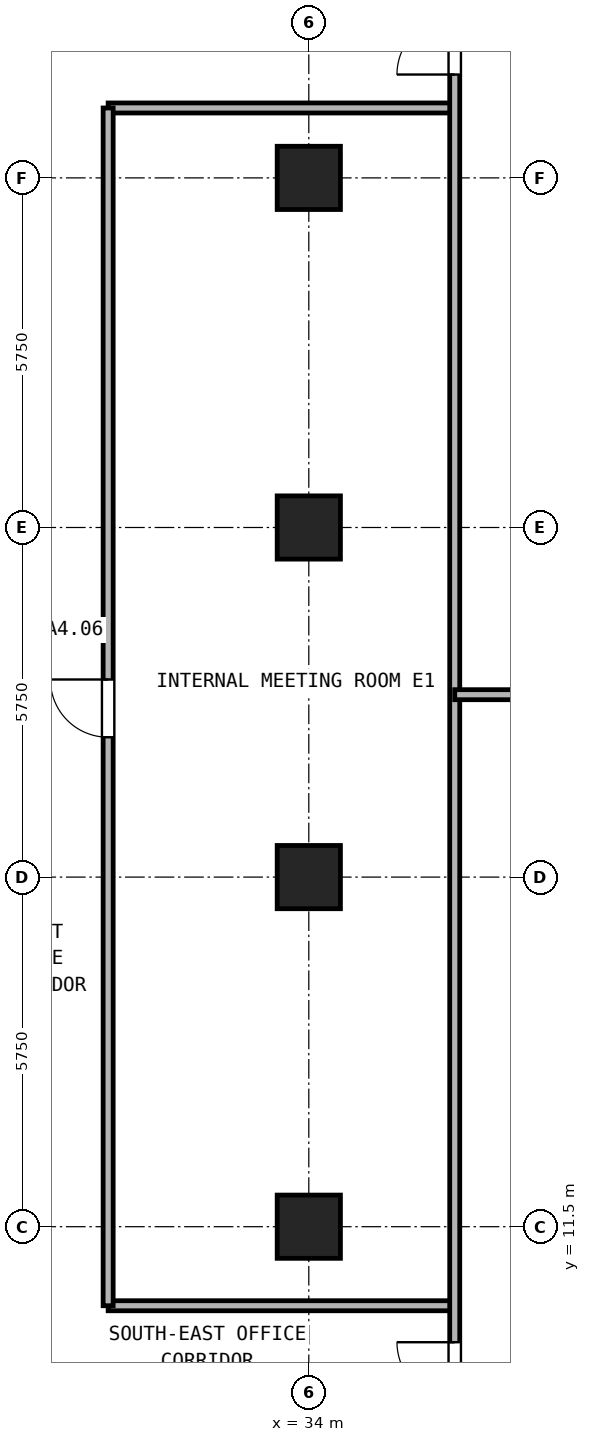
"""IFC4 building model, lengths in metres.
Left out: names, types, materials, properties, quantities, classifications, styles, units other than length and angle.
Written with IfcOpenShell. Run it as: python <this file> out.ifc"""

import sys

from ifc_helpers import new_model, si_unit, direction, frame, frame_2d, origin, origin_2d, place, context, subcontext, project, spatial, rectangle, hollow_rectangle, extrude, source, transform, mapped, element, fill, save


model = new_model("IFC4")
c1 = context("Model", 3, precision=1e-05, world=origin(), true_north=direction((0.0, 1.0)))
c2 = subcontext(c1, "Body", "Model", "MODEL_VIEW")
j1 = project(units=[si_unit("LENGTHUNIT", "METRE"), si_unit("PLANEANGLEUNIT", "RADIAN")], contexts=[c1])
p1 = place(None, origin())
s1 = spatial("IfcSite", under=j1, at=p1, CompositionType="ELEMENT")
p2 = place(p1, origin())
s2 = spatial("IfcBuilding", under=s1, at=p2, CompositionType="ELEMENT")
p3 = place(p2, frame((0.0, 0.0, 44.1)))
s3 = spatial("IfcBuildingStorey", under=s2, at=p3, CompositionType="ELEMENT", Elevation=44.1)
m1 = source(origin(), c2, "Body", "SweptSolid", [
    extrude(hollow_rectangle(XDim=1.04, YDim=1.04, WallThickness=0.065, at=origin_2d()), origin(), (0.0, 0.0, 1.0), 3.32),
])
for number, where, z_axis, x_axis in (
    (1, (34.0, 11.5, 0.0), (0.0, 0.0, 1.0), (1.0, 0.0, 0.0)),
    (2, (34.0, 17.25, 0.0), (0.0, 0.0, 1.0), (1.0, 0.0, 0.0)),
    (3, (34.0, 23.0, 0.0), (0.0, 0.0, 1.0), (1.0, 0.0, 0.0)),
    (4, (34.0, 28.75, 0.0), (0.0, 0.0, 1.0), (1.0, 0.0, 0.0)),
):
    element("IfcColumn", number, at=place(p3, frame(where, z_axis=z_axis, x_axis=x_axis)), inside=s3, PredefinedType="COLUMN", context=c2, shape_type="MappedRepresentation", body=[
        mapped(m1, transform((0.0, 0.0, 0.0), x_axis=(1.0, 0.0, 0.0), y_axis=(0.0, 1.0, 0.0), z_axis=(0.0, 0.0, 1.0), scale=1.0)),
    ])
for number, where, z_axis, x_axis in (
    (5, (30.7, 10.2, 0.0), (0.0, 0.0, 1.0), (1.0, 0.0, 0.0)),
    (6, (30.7, 29.9, 0.0), (0.0, 0.0, 1.0), (1.0, 0.0, 0.0)),
):
    element("IfcWall", number, at=place(p3, frame(where, z_axis=z_axis, x_axis=x_axis)), inside=s3, PredefinedType="PARTITIONING", context=c2, shape_type="SweptSolid", body=[
        extrude(rectangle(XDim=5.7, YDim=0.165, at=frame_2d((2.85, 0.0))), origin(), (0.0, 0.0, 1.0), 3.32),
    ])
p4 = place(p3, frame((30.7, 10.2, 0.0), z_axis=(0.0, 0.0, 1.0), x_axis=(0.0, 1.0, 0.0)))
e7 = element("IfcWall", 7, at=p4, inside=s3, PredefinedType="PARTITIONING", context=c2, shape_type="SweptSolid", body=[
    extrude(rectangle(XDim=19.7, YDim=0.165, at=frame_2d((9.85, 0.0))), origin(), (0.0, 0.0, 1.0), 3.32),
])
p5 = place(p4, frame((9.35, 0.0, 0.0)))
e8 = element("IfcOpeningElement", 8, at=p5, cuts=e7, PredefinedType="OPENING", context=c2, shape_type="SweptSolid", body=[
    extrude(rectangle(XDim=0.95, YDim=2.15, at=frame_2d((0.475, 1.075))), frame((0.0, 0.093, 0.0), z_axis=(0.0, -1.0, 0.0), x_axis=(1.0, 0.0, 0.0)), (0.0, 0.0, 1.0), 0.185),
])
p6 = place(p3, frame((36.4, 0.16, 0.0), z_axis=(0.0, 0.0, 1.0), x_axis=(0.0, 1.0, 0.0)))
e9 = element("IfcWall", 9, at=p6, inside=s3, PredefinedType="PARTITIONING", context=c2, shape_type="SweptSolid", body=[
    extrude(rectangle(XDim=40.18, YDim=0.165, at=frame_2d((20.09, 0.0))), origin(), (0.0, 0.0, 1.0), 3.32),
])
p7 = place(p6, frame((8.49, 0.0, 0.0)))
e10 = element("IfcOpeningElement", 10, at=p7, cuts=e9, PredefinedType="OPENING", context=c2, shape_type="SweptSolid", body=[
    extrude(rectangle(XDim=0.95, YDim=2.15, at=frame_2d((0.475, 1.075))), frame((0.0, 0.093, 0.0), z_axis=(0.0, -1.0, 0.0), x_axis=(1.0, 0.0, 0.0)), (0.0, 0.0, 1.0), 0.185),
])
p8 = place(p6, frame((30.29, 0.0, 0.0)))
e11 = element("IfcOpeningElement", 11, at=p8, cuts=e9, PredefinedType="OPENING", context=c2, shape_type="SweptSolid", body=[
    extrude(rectangle(XDim=0.95, YDim=2.15, at=frame_2d((0.475, 1.075))), frame((0.0, 0.093, 0.0), z_axis=(0.0, -1.0, 0.0), x_axis=(1.0, 0.0, 0.0)), (0.0, 0.0, 1.0), 0.185),
])
p9 = place(p3, frame((36.4, 20.25, 0.0), z_axis=(0.0, 0.0, 1.0), x_axis=(1.0, 0.0, 0.0)))
e12 = element("IfcWall", 12, at=p9, inside=s3, PredefinedType="PARTITIONING", context=c2, shape_type="SweptSolid", body=[
    extrude(rectangle(XDim=10.44, YDim=0.165, at=frame_2d((5.22, 0.0))), origin(), (0.0, 0.0, 1.0), 2.898),
])
p10 = place(p7, origin())
e13 = element("IfcDoor", 13, at=p10, inside=s3, OperationType="SINGLE_SWING_RIGHT", PredefinedType="DOOR", context=c2, shape_type="SweptSolid", body=[
    extrude(rectangle(XDim=0.95, YDim=2.15, at=frame_2d((0.475, 1.075))), frame((0.0, 0.025, 0.0), z_axis=(0.0, -1.0, 0.0), x_axis=(1.0, 0.0, 0.0)), (0.0, 0.0, 1.0), 0.05),
])
fill(e10, e13)
p11 = place(p8, origin())
e14 = element("IfcDoor", 14, at=p11, inside=s3, OperationType="SINGLE_SWING_LEFT", PredefinedType="DOOR", context=c2, shape_type="SweptSolid", body=[
    extrude(rectangle(XDim=0.95, YDim=2.15, at=frame_2d((0.475, 1.075))), frame((0.0, 0.025, 0.0), z_axis=(0.0, -1.0, 0.0), x_axis=(1.0, 0.0, 0.0)), (0.0, 0.0, 1.0), 0.05),
])
fill(e11, e14)
p12 = place(p5, origin())
e15 = element("IfcDoor", 15, at=p12, inside=s3, OperationType="SINGLE_SWING_RIGHT", PredefinedType="DOOR", context=c2, shape_type="SweptSolid", body=[
    extrude(rectangle(XDim=0.95, YDim=2.15, at=frame_2d((0.475, 1.075))), frame((0.0, 0.025, 0.0), z_axis=(0.0, -1.0, 0.0), x_axis=(1.0, 0.0, 0.0)), (0.0, 0.0, 1.0), 0.05),
])
fill(e8, e15)
save(model, sys.argv[1])
